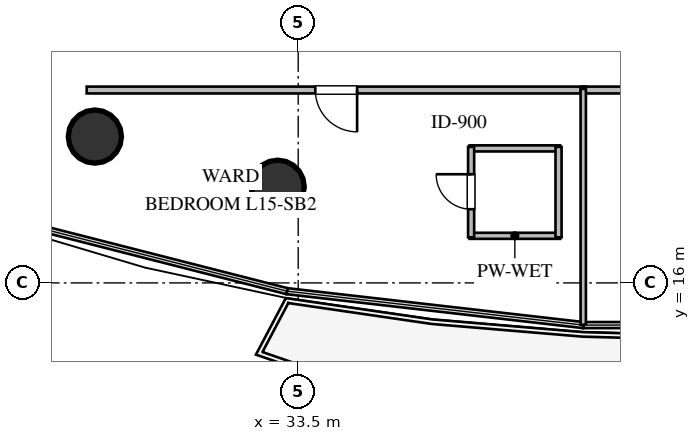
"""IFC4 building model, lengths in metres.
Left out: names, types, materials, properties, quantities, classifications, styles, units other than length and angle.
Written with IfcOpenShell. Run it as: python <this file> out.ifc"""

import sys

from ifc_helpers import new_model, si_unit, direction, frame, frame_2d, origin, origin_2d, place, context, subcontext, project, spatial, rectangle, circle, extrude, element, fill, save


model = new_model("IFC4")
c1 = context("Model", 3, precision=1e-05, world=origin(), true_north=direction((0.0, 1.0)))
c2 = subcontext(c1, "Body", "Model", "MODEL_VIEW")
j1 = project(units=[si_unit("LENGTHUNIT", "METRE"), si_unit("PLANEANGLEUNIT", "RADIAN")], contexts=[c1])
p1 = place(None, origin())
s1 = spatial("IfcSite", under=j1, at=p1, CompositionType="ELEMENT")
p2 = place(p1, origin())
s2 = spatial("IfcBuilding", under=s1, at=p2, CompositionType="ELEMENT")
p3 = place(p2, frame((0.0, 0.0, 60.0)))
s3 = spatial("IfcBuildingStorey", under=s2, at=p3, CompositionType="ELEMENT", Elevation=60.0)
for number, where, z_axis, x_axis in (
    (1, (28.15, 19.85, 0.0), (0.0, 0.0, 1.0), (1.0, 0.0, 0.0)),
    (2, (32.96, 18.53, 0.0), (0.0, 0.0, 1.0), (1.0, 0.0, 0.0)),
):
    element("IfcColumn", number, at=place(p3, frame(where, z_axis=z_axis, x_axis=x_axis)), inside=s3, PredefinedType="COLUMN", context=c2, shape_type="SweptSolid", body=[
        extrude(circle(Radius=0.7, at=origin_2d()), origin(), (0.0, 0.0, 1.0), 3.6),
    ])
p4 = place(p3, frame((38.01, 17.239, 0.0), z_axis=(0.0, 0.0, 1.0), x_axis=(1.0, 0.0, 0.0)))
e3 = element("IfcWall", 3, at=p4, inside=s3, PredefinedType="PLUMBINGWALL", context=c2, shape_type="SweptSolid", body=[
    extrude(rectangle(XDim=2.38, YDim=0.16, at=frame_2d((1.19, 0.0))), origin(), (0.0, 0.0, 1.0), 2.738),
])
p5 = place(p3, frame((38.01, 19.539, 0.0), z_axis=(0.0, 0.0, 1.0), x_axis=(1.0, 0.0, 0.0)))
e4 = element("IfcWall", 4, at=p5, inside=s3, PredefinedType="PLUMBINGWALL", context=c2, shape_type="SweptSolid", body=[
    extrude(rectangle(XDim=2.38, YDim=0.16, at=frame_2d((1.19, 0.0))), origin(), (0.0, 0.0, 1.0), 3.36),
])
p6 = place(p3, frame((38.05, 17.199, 0.0), z_axis=(0.0, 0.0, 1.0), x_axis=(0.0, 1.0, 0.0)))
e5 = element("IfcWall", 5, at=p6, inside=s3, PredefinedType="PLUMBINGWALL", context=c2, shape_type="SweptSolid", body=[
    extrude(rectangle(XDim=2.38, YDim=0.16, at=frame_2d((1.19, 0.0))), origin(), (0.0, 0.0, 1.0), 3.36),
])
p7 = place(p6, frame((0.74, 0.0, 0.0)))
e6 = element("IfcOpeningElement", 6, at=p7, cuts=e5, PredefinedType="OPENING", context=c2, shape_type="SweptSolid", body=[
    extrude(rectangle(XDim=0.92, YDim=2.1, at=frame_2d((0.46, 1.05))), frame((0.0, 0.09, 0.0), z_axis=(0.0, -1.0, 0.0), x_axis=(1.0, 0.0, 0.0)), (0.0, 0.0, 1.0), 0.18),
])
p8 = place(p3, frame((40.35, 17.199, 0.0), z_axis=(0.0, 0.0, 1.0), x_axis=(0.0, 1.0, 0.0)))
e7 = element("IfcWall", 7, at=p8, inside=s3, PredefinedType="PLUMBINGWALL", context=c2, shape_type="SweptSolid", body=[
    extrude(rectangle(XDim=2.38, YDim=0.16, at=frame_2d((1.19, 0.0))), origin(), (0.0, 0.0, 1.0), 3.36),
])
p9 = place(p3, frame((41.065, 21.075, 0.0), z_axis=(0.0, 0.0, 1.0), x_axis=(-1.0, 0.0, 0.0)))
e8 = element("IfcWall", 8, at=p9, inside=s3, PredefinedType="PARTITIONING", context=c2, shape_type="SweptSolid", body=[
    extrude(rectangle(XDim=13.13, YDim=0.18, at=frame_2d((6.565, 0.0))), origin(), (0.0, 0.0, 1.0), 2.996),
])
p10 = place(p9, frame((6.015, 0.0, 0.0)))
e9 = element("IfcOpeningElement", 9, at=p10, cuts=e8, PredefinedType="OPENING", context=c2, shape_type="SweptSolid", body=[
    extrude(rectangle(XDim=1.1, YDim=2.1, at=frame_2d((0.55, 1.05))), frame((0.0, 0.1, 0.0), z_axis=(0.0, -1.0, 0.0), x_axis=(1.0, 0.0, 0.0)), (0.0, 0.0, 1.0), 0.2),
])
p11 = place(p3, frame((46.555, 21.075, 0.0), z_axis=(0.0, 0.0, 1.0), x_axis=(-1.0, 0.0, 0.0)))
e10 = element("IfcWall", 10, at=p11, inside=s3, PredefinedType="PARTITIONING", context=c2, shape_type="SweptSolid", body=[
    extrude(rectangle(XDim=5.62, YDim=0.18, at=frame_2d((2.81, 0.0))), origin(), (0.0, 0.0, 1.0), 3.36),
])
p12 = place(p11, frame((2.21, 0.0, 0.0)))
e11 = element("IfcOpeningElement", 11, at=p12, cuts=e10, PredefinedType="OPENING", context=c2, shape_type="SweptSolid", body=[
    extrude(rectangle(XDim=1.2, YDim=2.15, at=frame_2d((0.6, 1.075))), frame((0.0, 0.1, 0.0), z_axis=(0.0, -1.0, 0.0), x_axis=(1.0, 0.0, 0.0)), (0.0, 0.0, 1.0), 0.2),
])
p13 = place(p3, frame((41.0, 21.105, 0.0), z_axis=(0.0, 0.0, 1.0), x_axis=(0.0, -1.0, 0.0)))
e12 = element("IfcWall", 12, at=p13, inside=s3, PredefinedType="PARTITIONING", context=c2, shape_type="SweptSolid", body=[
    extrude(rectangle(XDim=6.205, YDim=0.14, at=frame_2d((3.103, 0.0))), origin(), (0.0, 0.0, 1.0), 3.36),
])
p14 = place(p7, origin())
e13 = element("IfcDoor", 13, at=p14, inside=s3, OperationType="SINGLE_SWING_RIGHT", PredefinedType="DOOR", context=c2, shape_type="SweptSolid", body=[
    extrude(rectangle(XDim=0.92, YDim=2.1, at=frame_2d((0.46, 1.05))), frame((0.0, 0.025, 0.0), z_axis=(0.0, -1.0, 0.0), x_axis=(1.0, 0.0, 0.0)), (0.0, 0.0, 1.0), 0.05),
])
fill(e6, e13)
p15 = place(p10, origin())
e14 = element("IfcDoor", 14, at=p15, inside=s3, OperationType="SINGLE_SWING_LEFT", PredefinedType="DOOR", context=c2, shape_type="SweptSolid", body=[
    extrude(rectangle(XDim=1.1, YDim=2.1, at=frame_2d((0.55, 1.05))), frame((0.0, 0.025, 0.0), z_axis=(0.0, -1.0, 0.0), x_axis=(1.0, 0.0, 0.0)), (0.0, 0.0, 1.0), 0.05),
])
fill(e9, e14)
save(model, sys.argv[1])
